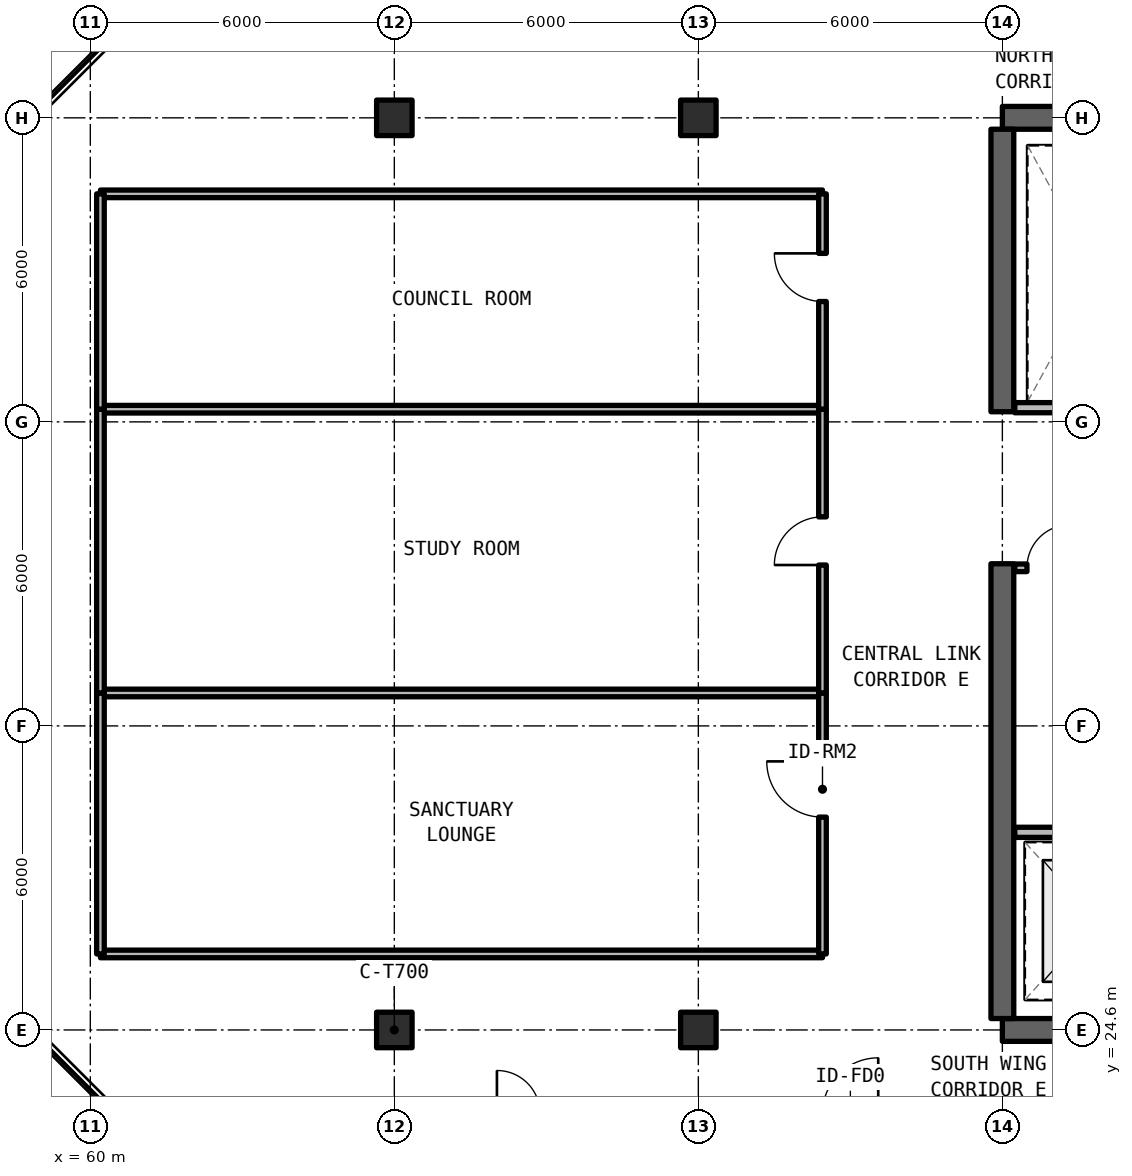
"""IFC4 building model, lengths in metres.
Left out: names, types, materials, properties, quantities, classifications, styles, units other than length and angle.
Written with IfcOpenShell. Run it as: python <this file> out.ifc"""

import sys

from ifc_helpers import new_model, si_unit, direction, frame, frame_2d, origin, origin_2d, place, context, subcontext, project, spatial, rectangle, extrude, element, fill, save


model = new_model("IFC4")
c1 = context("Model", 3, precision=1e-05, world=origin(), true_north=direction((0.0, 1.0)))
c2 = subcontext(c1, "Body", "Model", "MODEL_VIEW")
j1 = project(units=[si_unit("LENGTHUNIT", "METRE"), si_unit("PLANEANGLEUNIT", "RADIAN")], contexts=[c1])
p1 = place(None, origin())
s1 = spatial("IfcSite", under=j1, at=p1, CompositionType="ELEMENT")
p2 = place(p1, origin())
s2 = spatial("IfcBuilding", under=s1, at=p2, CompositionType="ELEMENT")
p3 = place(p2, frame((0.0, 0.0, 235.95)))
s3 = spatial("IfcBuildingStorey", under=s2, at=p3, CompositionType="ELEMENT", Elevation=235.95)
for number, where, z_axis, x_axis in (
    (1, (78.0, 24.6, 0.0), (0.0, 0.0, 1.0), (1.0, 0.0, 0.0)),
    (2, (90.0, 42.6, 0.0), (0.0, 0.0, 1.0), (-1.0, 0.0, 0.0)),
):
    element("IfcWall", number, at=place(p3, frame(where, z_axis=z_axis, x_axis=x_axis)), inside=s3, PredefinedType="SHEAR", context=c2, shape_type="SweptSolid", body=[
        extrude(rectangle(XDim=12.0, YDim=0.45, at=frame_2d((6.0, 0.0))), origin(), (0.0, 0.0, 1.0), 3.3),
    ])
p4 = place(p3, frame((78.0, 24.825, 0.0), z_axis=(0.0, 0.0, 1.0), x_axis=(0.0, 1.0, 0.0)))
e3 = element("IfcWall", 3, at=p4, inside=s3, PredefinedType="SHEAR", context=c2, shape_type="SweptSolid", body=[
    extrude(rectangle(XDim=8.975, YDim=0.45, at=frame_2d((4.488, 0.0))), origin(), (0.0, 0.0, 1.0), 3.3),
])
p5 = place(p3, frame((78.0, 36.8, 0.0), z_axis=(0.0, 0.0, 1.0), x_axis=(0.0, 1.0, 0.0)))
e4 = element("IfcWall", 4, at=p5, inside=s3, PredefinedType="SHEAR", context=c2, shape_type="SweptSolid", body=[
    extrude(rectangle(XDim=5.575, YDim=0.45, at=frame_2d((2.788, 0.0))), origin(), (0.0, 0.0, 1.0), 3.3),
])
for number, where, z_axis, x_axis in (
    (5, (66.0, 24.6, 0.0), (0.0, 0.0, 1.0), (1.0, 0.0, 0.0)),
    (6, (66.0, 42.6, 0.0), (0.0, 0.0, 1.0), (1.0, 0.0, 0.0)),
    (7, (72.0, 24.6, 0.0), (0.0, 0.0, 1.0), (1.0, 0.0, 0.0)),
    (8, (72.0, 42.6, 0.0), (0.0, 0.0, 1.0), (1.0, 0.0, 0.0)),
):
    element("IfcColumn", number, at=place(p3, frame(where, z_axis=z_axis, x_axis=x_axis)), inside=s3, PredefinedType="COLUMN", context=c2, shape_type="SweptSolid", body=[
        extrude(rectangle(XDim=0.7, YDim=0.7, at=origin_2d()), origin(), (0.0, 0.0, 1.0), 3.3),
    ])
p6 = place(p3, frame((78.245, 28.5, 0.0), z_axis=(0.0, 0.0, 1.0), x_axis=(1.0, 0.0, 0.0)))
e9 = element("IfcWall", 9, at=p6, inside=s3, PredefinedType="SOLIDWALL", context=c2, shape_type="SweptSolid", body=[
    extrude(rectangle(XDim=7.585, YDim=0.2, at=frame_2d((3.792, 0.0))), origin(), (0.0, 0.0, 1.0), 2.35),
])
p7 = place(p6, frame((3.555, 0.0, 0.0)))
e10 = element("IfcOpeningElement", 10, at=p7, cuts=e9, PredefinedType="OPENING", context=c2, shape_type="SweptSolid", body=[
    extrude(rectangle(XDim=1.0, YDim=2.15, at=frame_2d((0.5, 1.075))), frame((0.0, 0.11, 0.0), z_axis=(0.0, -1.0, 0.0), x_axis=(1.0, 0.0, 0.0)), (0.0, 0.0, 1.0), 0.22),
])
p8 = place(p3, frame((78.245, 33.72, 0.0), z_axis=(0.0, 0.0, 1.0), x_axis=(1.0, 0.0, 0.0)))
e11 = element("IfcWall", 11, at=p8, inside=s3, PredefinedType="SOLIDWALL", context=c2, shape_type="SweptSolid", body=[
    extrude(rectangle(XDim=1.395, YDim=0.15, at=frame_2d((0.697, 0.0))), origin(), (0.0, 0.0, 1.0), 2.35),
])
p9 = place(p8, frame((0.24, 0.0, 0.0)))
e12 = element("IfcOpeningElement", 12, at=p9, cuts=e11, PredefinedType="OPENING", context=c2, shape_type="SweptSolid", body=[
    extrude(rectangle(XDim=0.85, YDim=2.1, at=frame_2d((0.425, 1.05))), frame((0.0, 0.085, 0.0), z_axis=(0.0, -1.0, 0.0), x_axis=(1.0, 0.0, 0.0)), (0.0, 0.0, 1.0), 0.17),
])
p10 = place(p3, frame((78.245, 36.88, 0.0), z_axis=(0.0, 0.0, 1.0), x_axis=(1.0, 0.0, 0.0)))
e13 = element("IfcWall", 13, at=p10, inside=s3, PredefinedType="SOLIDWALL", context=c2, shape_type="SweptSolid", body=[
    extrude(rectangle(XDim=3.075, YDim=0.2, at=frame_2d((1.538, 0.0))), origin(), (0.0, 0.0, 1.0), 2.35),
])
for number, where, z_axis, x_axis in (
    (14, (60.2, 26.1, 0.0), (0.0, 0.0, 1.0), (1.0, 0.0, 0.0)),
    (15, (60.2, 31.25, 0.0), (0.0, 0.0, 1.0), (1.0, 0.0, 0.0)),
):
    element("IfcWall", number, at=place(p3, frame(where, z_axis=z_axis, x_axis=x_axis)), inside=s3, PredefinedType="SOLIDWALL", context=c2, shape_type="SweptSolid", body=[
        extrude(rectangle(XDim=14.25, YDim=0.15, at=frame_2d((7.125, 0.0))), origin(), (0.0, 0.0, 1.0), 2.35),
    ])
p11 = place(p3, frame((60.2, 26.1, 0.0), z_axis=(0.0, 0.0, 1.0), x_axis=(0.0, 1.0, 0.0)))
e16 = element("IfcWall", 16, at=p11, inside=s3, PredefinedType="SOLIDWALL", context=c2, shape_type="SweptSolid", body=[
    extrude(rectangle(XDim=5.15, YDim=0.15, at=frame_2d((2.575, 0.0))), origin(), (0.0, 0.0, 1.0), 2.35),
])
p12 = place(p3, frame((74.45, 26.1, 0.0), z_axis=(0.0, 0.0, 1.0), x_axis=(0.0, 1.0, 0.0)))
e17 = element("IfcWall", 17, at=p12, inside=s3, PredefinedType="SOLIDWALL", context=c2, shape_type="SweptSolid", body=[
    extrude(rectangle(XDim=5.15, YDim=0.15, at=frame_2d((2.575, 0.0))), origin(), (0.0, 0.0, 1.0), 2.35),
])
p13 = place(p12, frame((2.7, 0.0, 0.0)))
e18 = element("IfcOpeningElement", 18, at=p13, cuts=e17, PredefinedType="OPENING", context=c2, shape_type="SweptSolid", body=[
    extrude(rectangle(XDim=1.1, YDim=2.15, at=frame_2d((0.55, 1.075))), frame((0.0, 0.085, 0.0), z_axis=(0.0, -1.0, 0.0), x_axis=(1.0, 0.0, 0.0)), (0.0, 0.0, 1.0), 0.17),
])
p14 = place(p3, frame((60.2, 36.85, 0.0), z_axis=(0.0, 0.0, 1.0), x_axis=(1.0, 0.0, 0.0)))
e19 = element("IfcWall", 19, at=p14, inside=s3, PredefinedType="SOLIDWALL", context=c2, shape_type="SweptSolid", body=[
    extrude(rectangle(XDim=14.25, YDim=0.15, at=frame_2d((7.125, 0.0))), origin(), (0.0, 0.0, 1.0), 2.35),
])
p15 = place(p3, frame((60.2, 31.25, 0.0), z_axis=(0.0, 0.0, 1.0), x_axis=(0.0, 1.0, 0.0)))
e20 = element("IfcWall", 20, at=p15, inside=s3, PredefinedType="SOLIDWALL", context=c2, shape_type="SweptSolid", body=[
    extrude(rectangle(XDim=5.6, YDim=0.15, at=frame_2d((2.8, 0.0))), origin(), (0.0, 0.0, 1.0), 2.35),
])
p16 = place(p3, frame((74.45, 31.25, 0.0), z_axis=(0.0, 0.0, 1.0), x_axis=(0.0, 1.0, 0.0)))
e21 = element("IfcWall", 21, at=p16, inside=s3, PredefinedType="SOLIDWALL", context=c2, shape_type="SweptSolid", body=[
    extrude(rectangle(XDim=5.6, YDim=0.15, at=frame_2d((2.8, 0.0))), origin(), (0.0, 0.0, 1.0), 2.35),
])
p17 = place(p16, frame((2.525, 0.0, 0.0)))
e22 = element("IfcOpeningElement", 22, at=p17, cuts=e21, PredefinedType="OPENING", context=c2, shape_type="SweptSolid", body=[
    extrude(rectangle(XDim=0.95, YDim=2.15, at=frame_2d((0.475, 1.075))), frame((0.0, 0.085, 0.0), z_axis=(0.0, -1.0, 0.0), x_axis=(1.0, 0.0, 0.0)), (0.0, 0.0, 1.0), 0.17),
])
p18 = place(p3, frame((60.2, 41.1, 0.0), z_axis=(0.0, 0.0, 1.0), x_axis=(1.0, 0.0, 0.0)))
e23 = element("IfcWall", 23, at=p18, inside=s3, PredefinedType="SOLIDWALL", context=c2, shape_type="SweptSolid", body=[
    extrude(rectangle(XDim=14.25, YDim=0.15, at=frame_2d((7.125, 0.0))), origin(), (0.0, 0.0, 1.0), 2.35),
])
p19 = place(p3, frame((60.2, 36.85, 0.0), z_axis=(0.0, 0.0, 1.0), x_axis=(0.0, 1.0, 0.0)))
e24 = element("IfcWall", 24, at=p19, inside=s3, PredefinedType="SOLIDWALL", context=c2, shape_type="SweptSolid", body=[
    extrude(rectangle(XDim=4.25, YDim=0.15, at=frame_2d((2.125, 0.0))), origin(), (0.0, 0.0, 1.0), 2.35),
])
p20 = place(p3, frame((74.45, 36.85, 0.0), z_axis=(0.0, 0.0, 1.0), x_axis=(0.0, 1.0, 0.0)))
e25 = element("IfcWall", 25, at=p20, inside=s3, PredefinedType="SOLIDWALL", context=c2, shape_type="SweptSolid", body=[
    extrude(rectangle(XDim=4.25, YDim=0.15, at=frame_2d((2.125, 0.0))), origin(), (0.0, 0.0, 1.0), 2.35),
])
p21 = place(p20, frame((2.125, 0.0, 0.0)))
e26 = element("IfcOpeningElement", 26, at=p21, cuts=e25, PredefinedType="OPENING", context=c2, shape_type="SweptSolid", body=[
    extrude(rectangle(XDim=0.95, YDim=2.15, at=frame_2d((0.475, 1.075))), frame((0.0, 0.085, 0.0), z_axis=(0.0, -1.0, 0.0), x_axis=(1.0, 0.0, 0.0)), (0.0, 0.0, 1.0), 0.17),
])
p22 = place(p9, origin())
e27 = element("IfcDoor", 27, at=p22, inside=s3, OperationType="SINGLE_SWING_RIGHT", PredefinedType="DOOR", context=c2, shape_type="SweptSolid", body=[
    extrude(rectangle(XDim=0.85, YDim=2.1, at=frame_2d((0.425, 1.05))), frame((0.0, 0.025, 0.0), z_axis=(0.0, -1.0, 0.0), x_axis=(1.0, 0.0, 0.0)), (0.0, 0.0, 1.0), 0.05),
])
fill(e12, e27)
p23 = place(p13, origin())
e28 = element("IfcDoor", 28, at=p23, inside=s3, OperationType="SINGLE_SWING_RIGHT", PredefinedType="DOOR", context=c2, shape_type="SweptSolid", body=[
    extrude(rectangle(XDim=1.1, YDim=2.15, at=frame_2d((0.55, 1.075))), frame((0.0, 0.025, 0.0), z_axis=(0.0, -1.0, 0.0), x_axis=(1.0, 0.0, 0.0)), (0.0, 0.0, 1.0), 0.05),
])
fill(e18, e28)
p24 = place(p17, origin())
e29 = element("IfcDoor", 29, at=p24, inside=s3, OperationType="SINGLE_SWING_LEFT", PredefinedType="DOOR", context=c2, shape_type="SweptSolid", body=[
    extrude(rectangle(XDim=0.95, YDim=2.15, at=frame_2d((0.475, 1.075))), frame((0.0, 0.025, 0.0), z_axis=(0.0, -1.0, 0.0), x_axis=(1.0, 0.0, 0.0)), (0.0, 0.0, 1.0), 0.05),
])
fill(e22, e29)
p25 = place(p21, origin())
e30 = element("IfcDoor", 30, at=p25, inside=s3, OperationType="SINGLE_SWING_RIGHT", PredefinedType="DOOR", context=c2, shape_type="SweptSolid", body=[
    extrude(rectangle(XDim=0.95, YDim=2.15, at=frame_2d((0.475, 1.075))), frame((0.0, 0.025, 0.0), z_axis=(0.0, -1.0, 0.0), x_axis=(1.0, 0.0, 0.0)), (0.0, 0.0, 1.0), 0.05),
])
fill(e26, e30)
save(model, sys.argv[1])
